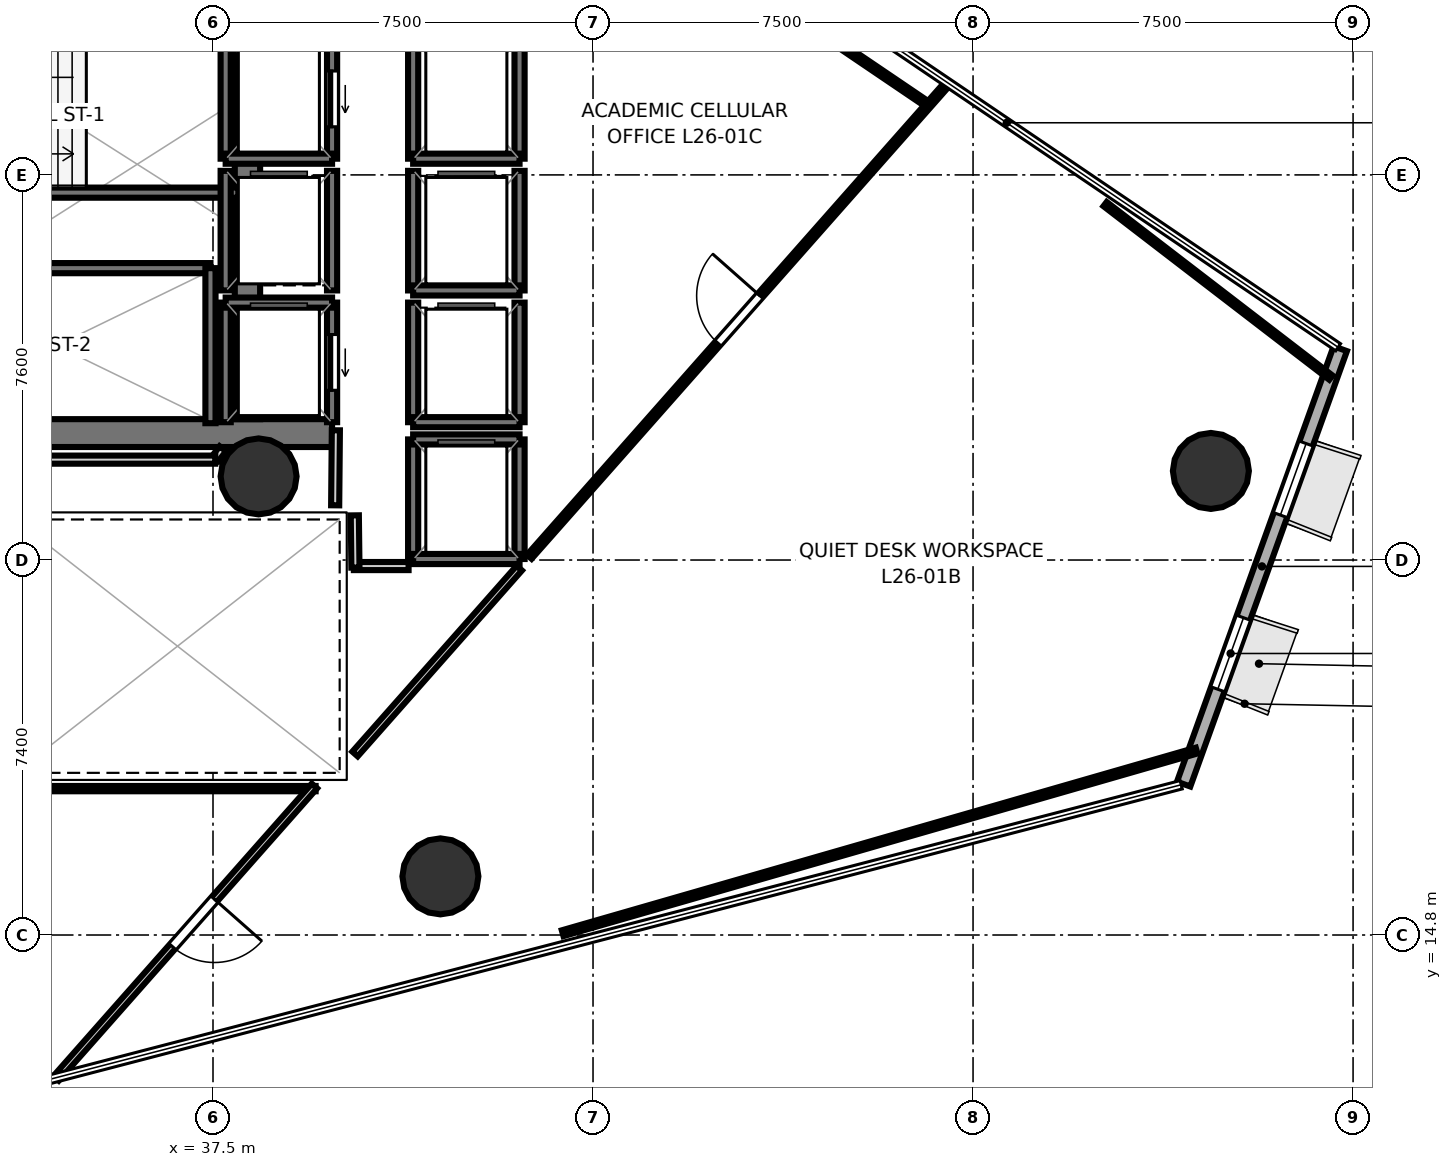
"""IFC4 building model, lengths in metres.
Left out: names, types, materials, properties, quantities, classifications, styles, units other than length and angle.
Written with IfcOpenShell. Run it as: python <this file> out.ifc"""

import sys

from ifc_helpers import new_model, si_unit, direction, frame, frame_2d, origin, origin_2d, place, context, subcontext, project, spatial, rectangle, hollow_circle, extrude, element, fill, save


model = new_model("IFC4")
c1 = context("Model", 3, precision=1e-05, world=origin(), true_north=direction((0.0, 1.0)))
c2 = subcontext(c1, "Body", "Model", "MODEL_VIEW")
j1 = project(units=[si_unit("LENGTHUNIT", "METRE"), si_unit("PLANEANGLEUNIT", "RADIAN")], contexts=[c1])
p1 = place(None, origin())
s1 = spatial("IfcSite", under=j1, at=p1, CompositionType="ELEMENT")
p2 = place(p1, origin())
s2 = spatial("IfcBuilding", under=s1, at=p2, CompositionType="ELEMENT")
p3 = place(p2, frame((0.0, 0.0, 105.2)))
s3 = spatial("IfcBuildingStorey", under=s2, at=p3, CompositionType="ELEMENT", Elevation=105.2)
p4 = place(p3, frame((29.23, 24.705, 0.0), z_axis=(0.0, 0.0, 1.0), x_axis=(1.0, 0.0, 0.0)))
e1 = element("IfcWall", 1, at=p4, inside=s3, PredefinedType="SHEAR", context=c2, shape_type="SweptSolid", body=[
    extrude(rectangle(XDim=10.62, YDim=0.55, at=frame_2d((5.31, 0.0))), origin(), (0.0, 0.0, 1.0), 3.52),
])
p5 = place(p4, frame((0.795, 0.0, 0.0)))
e2 = element("IfcOpeningElement", 2, at=p5, cuts=e1, PredefinedType="OPENING", context=c2, shape_type="SweptSolid", body=[
    extrude(rectangle(XDim=1.25, YDim=2.15, at=frame_2d((0.625, 1.075))), frame((0.0, 0.285, 0.0), z_axis=(0.0, -1.0, 0.0), x_axis=(1.0, 0.0, 0.0)), (0.0, 0.0, 1.0), 0.57),
])
p6 = place(p3, frame((38.18, 24.98, 0.0), z_axis=(0.0, 0.0, 1.0), x_axis=(0.0, 1.0, 0.0)))
e3 = element("IfcWall", 3, at=p6, inside=s3, PredefinedType="SHEAR", context=c2, shape_type="SweptSolid", body=[
    extrude(rectangle(XDim=7.44, YDim=0.5, at=frame_2d((3.72, 0.0))), origin(), (0.0, 0.0, 1.0), 3.52),
])
for number, where, z_axis, x_axis in (
    (4, (38.4, 23.85, 0.0), (0.0, 0.0, 1.0), (1.0, 0.0, 0.0)),
    (5, (57.194, 23.958, 0.0), (0.0, 0.0, 1.0), (1.0, 0.0, 0.0)),
    (6, (41.988, 15.957, 0.0), (0.0, 0.0, 1.0), (1.0, 0.0, 0.0)),
):
    element("IfcColumn", number, at=place(p3, frame(where, z_axis=z_axis, x_axis=x_axis)), inside=s3, PredefinedType="COLUMN", context=c2, shape_type="SweptSolid", body=[
        extrude(hollow_circle(Radius=0.75, WallThickness=0.036, at=origin_2d()), origin(), (0.0, 0.0, 1.0), 3.7),
    ])
p7 = place(p3, frame((56.656, 17.778, 0.0), z_axis=(0.0, 0.0, 1.0), x_axis=(0.338454364394, 0.940982807081, 0.0)))
e7 = element("IfcWall", 7, at=p7, inside=s3, PredefinedType="SOLIDWALL", context=c2, shape_type="SweptSolid", body=[
    extrude(rectangle(XDim=9.131, YDim=0.28, at=frame_2d((4.566, 0.0))), origin(), (0.0, 0.0, 1.0), 3.52),
])
p8 = place(p7, frame((1.99, 0.0, 0.85)))
e8 = element("IfcOpeningElement", 8, at=p8, cuts=e7, PredefinedType="OPENING", context=c2, shape_type="SweptSolid", body=[
    extrude(rectangle(XDim=1.5, YDim=2.1, at=frame_2d((0.75, 1.05))), frame((0.0, 0.15, 0.0), z_axis=(0.0, -1.0, 0.0), x_axis=(1.0, 0.0, 0.0)), (0.0, 0.0, 1.0), 0.3),
])
p9 = place(p7, frame((5.642, 0.0, 0.85)))
e9 = element("IfcOpeningElement", 9, at=p9, cuts=e7, PredefinedType="OPENING", context=c2, shape_type="SweptSolid", body=[
    extrude(rectangle(XDim=1.5, YDim=2.1, at=frame_2d((0.75, 1.05))), frame((0.0, 0.15, 0.0), z_axis=(0.0, -1.0, 0.0), x_axis=(1.0, 0.0, 0.0)), (0.0, 0.0, 1.0), 0.3),
])
p10 = place(p3, frame((29.7, 29.45, 0.0), z_axis=(0.0, 0.0, 1.0), x_axis=(1.0, 0.0, 0.0)))
e10 = element("IfcWall", 10, at=p10, inside=s3, PredefinedType="SOLIDWALL", context=c2, shape_type="SweptSolid", body=[
    extrude(rectangle(XDim=8.3, YDim=0.2, at=frame_2d((4.15, 0.0))), origin(), (0.0, 0.0, 1.0), 3.52),
])
p11 = place(p3, frame((29.7, 27.96, 0.0), z_axis=(0.0, 0.0, 1.0), x_axis=(1.0, 0.0, 0.0)))
e11 = element("IfcWall", 11, at=p11, inside=s3, PredefinedType="SOLIDWALL", context=c2, shape_type="SweptSolid", body=[
    extrude(rectangle(XDim=7.75, YDim=0.2, at=frame_2d((3.875, 0.0))), origin(), (0.0, 0.0, 1.0), 3.52),
])
p12 = place(p3, frame((37.45, 24.9, 0.0), z_axis=(0.0, 0.0, 1.0), x_axis=(0.0, 1.0, 0.0)))
e12 = element("IfcWall", 12, at=p12, inside=s3, PredefinedType="SOLIDWALL", context=c2, shape_type="SweptSolid", body=[
    extrude(rectangle(XDim=3.06, YDim=0.2, at=frame_2d((1.53, 0.0))), origin(), (0.0, 0.0, 1.0), 3.52),
])
p13 = place(p3, frame((39.85, 30.12, 0.0), z_axis=(0.0, 0.0, 1.0), x_axis=(0.0, 1.0, 0.0)))
e13 = element("IfcWall", 13, at=p13, inside=s3, PredefinedType="SOLIDWALL", context=c2, shape_type="SweptSolid", body=[
    extrude(rectangle(XDim=2.36, YDim=0.2, at=frame_2d((1.18, 0.0))), origin(), (0.0, 0.0, 1.0), 3.52),
])
p14 = place(p13, frame((0.63, 0.0, 0.0)))
e14 = element("IfcOpeningElement", 14, at=p14, cuts=e13, PredefinedType="OPENING", context=c2, shape_type="SweptSolid", body=[
    extrude(rectangle(XDim=1.1, YDim=2.15, at=frame_2d((0.55, 1.075))), frame((0.0, 0.11, 0.0), z_axis=(0.0, -1.0, 0.0), x_axis=(1.0, 0.0, 0.0)), (0.0, 0.0, 1.0), 0.22),
])
p15 = place(p3, frame((37.75, 30.12, 0.0), z_axis=(0.0, 0.0, 1.0), x_axis=(0.0, 1.0, 0.0)))
e15 = element("IfcWall", 15, at=p15, inside=s3, PredefinedType="SOLIDWALL", context=c2, shape_type="SweptSolid", body=[
    extrude(rectangle(XDim=2.36, YDim=0.2, at=frame_2d((1.18, 0.0))), origin(), (0.0, 0.0, 1.0), 3.52),
])
p16 = place(p3, frame((37.75, 30.12, 0.0), z_axis=(0.0, 0.0, 1.0), x_axis=(1.0, 0.0, 0.0)))
e16 = element("IfcWall", 16, at=p16, inside=s3, PredefinedType="SOLIDWALL", context=c2, shape_type="SweptSolid", body=[
    extrude(rectangle(XDim=2.1, YDim=0.2, at=frame_2d((1.05, 0.0))), origin(), (0.0, 0.0, 1.0), 3.52),
])
p17 = place(p3, frame((39.85, 24.92, 0.0), z_axis=(0.0, 0.0, 1.0), x_axis=(0.0, 1.0, 0.0)))
e17 = element("IfcWall", 17, at=p17, inside=s3, PredefinedType="SOLIDWALL", context=c2, shape_type="SweptSolid", body=[
    extrude(rectangle(XDim=2.36, YDim=0.2, at=frame_2d((1.18, 0.0))), origin(), (0.0, 0.0, 1.0), 3.52),
])
p18 = place(p17, frame((0.63, 0.0, 0.0)))
e18 = element("IfcOpeningElement", 18, at=p18, cuts=e17, PredefinedType="OPENING", context=c2, shape_type="SweptSolid", body=[
    extrude(rectangle(XDim=1.1, YDim=2.15, at=frame_2d((0.55, 1.075))), frame((0.0, 0.11, 0.0), z_axis=(0.0, -1.0, 0.0), x_axis=(1.0, 0.0, 0.0)), (0.0, 0.0, 1.0), 0.22),
])
p19 = place(p3, frame((37.75, 24.92, 0.0), z_axis=(0.0, 0.0, 1.0), x_axis=(0.0, 1.0, 0.0)))
e19 = element("IfcWall", 19, at=p19, inside=s3, PredefinedType="SOLIDWALL", context=c2, shape_type="SweptSolid", body=[
    extrude(rectangle(XDim=2.36, YDim=0.2, at=frame_2d((1.18, 0.0))), origin(), (0.0, 0.0, 1.0), 3.52),
])
p20 = place(p3, frame((37.75, 27.28, 0.0), z_axis=(0.0, 0.0, 1.0), x_axis=(1.0, 0.0, 0.0)))
e20 = element("IfcWall", 20, at=p20, inside=s3, PredefinedType="SOLIDWALL", context=c2, shape_type="SweptSolid", body=[
    extrude(rectangle(XDim=2.1, YDim=0.2, at=frame_2d((1.05, 0.0))), origin(), (0.0, 0.0, 1.0), 3.52),
])
for number, where, z_axis, x_axis in (
    (21, (43.55, 30.12, 0.0), (0.0, 0.0, 1.0), (0.0, 1.0, 0.0)),
    (22, (41.45, 30.12, 0.0), (0.0, 0.0, 1.0), (0.0, 1.0, 0.0)),
):
    element("IfcWall", number, at=place(p3, frame(where, z_axis=z_axis, x_axis=x_axis)), inside=s3, PredefinedType="SOLIDWALL", context=c2, shape_type="SweptSolid", body=[
        extrude(rectangle(XDim=2.36, YDim=0.2, at=frame_2d((1.18, 0.0))), origin(), (0.0, 0.0, 1.0), 3.52),
    ])
p21 = place(p3, frame((41.45, 30.12, 0.0), z_axis=(0.0, 0.0, 1.0), x_axis=(1.0, 0.0, 0.0)))
e23 = element("IfcWall", 23, at=p21, inside=s3, PredefinedType="SOLIDWALL", context=c2, shape_type="SweptSolid", body=[
    extrude(rectangle(XDim=2.1, YDim=0.2, at=frame_2d((1.05, 0.0))), origin(), (0.0, 0.0, 1.0), 3.52),
])
for number, where, z_axis, x_axis in (
    (24, (43.55, 27.52, 0.0), (0.0, 0.0, 1.0), (0.0, 1.0, 0.0)),
    (25, (41.45, 27.52, 0.0), (0.0, 0.0, 1.0), (0.0, 1.0, 0.0)),
):
    element("IfcWall", number, at=place(p3, frame(where, z_axis=z_axis, x_axis=x_axis)), inside=s3, PredefinedType="SOLIDWALL", context=c2, shape_type="SweptSolid", body=[
        extrude(rectangle(XDim=2.36, YDim=0.2, at=frame_2d((1.18, 0.0))), origin(), (0.0, 0.0, 1.0), 3.52),
    ])
p22 = place(p3, frame((41.45, 27.52, 0.0), z_axis=(0.0, 0.0, 1.0), x_axis=(1.0, 0.0, 0.0)))
e26 = element("IfcWall", 26, at=p22, inside=s3, PredefinedType="SOLIDWALL", context=c2, shape_type="SweptSolid", body=[
    extrude(rectangle(XDim=2.1, YDim=0.2, at=frame_2d((1.05, 0.0))), origin(), (0.0, 0.0, 1.0), 3.52),
])
for number, where, z_axis, x_axis in (
    (27, (43.55, 24.92, 0.0), (0.0, 0.0, 1.0), (0.0, 1.0, 0.0)),
    (28, (41.45, 24.92, 0.0), (0.0, 0.0, 1.0), (0.0, 1.0, 0.0)),
):
    element("IfcWall", number, at=place(p3, frame(where, z_axis=z_axis, x_axis=x_axis)), inside=s3, PredefinedType="SOLIDWALL", context=c2, shape_type="SweptSolid", body=[
        extrude(rectangle(XDim=2.36, YDim=0.2, at=frame_2d((1.18, 0.0))), origin(), (0.0, 0.0, 1.0), 3.52),
    ])
p23 = place(p3, frame((41.45, 24.92, 0.0), z_axis=(0.0, 0.0, 1.0), x_axis=(1.0, 0.0, 0.0)))
e29 = element("IfcWall", 29, at=p23, inside=s3, PredefinedType="SOLIDWALL", context=c2, shape_type="SweptSolid", body=[
    extrude(rectangle(XDim=2.1, YDim=0.2, at=frame_2d((1.05, 0.0))), origin(), (0.0, 0.0, 1.0), 3.52),
])
for number, where, z_axis, x_axis in (
    (30, (39.85, 27.52, 0.0), (0.0, 0.0, 1.0), (0.0, 1.0, 0.0)),
    (31, (37.75, 27.52, 0.0), (0.0, 0.0, 1.0), (0.0, 1.0, 0.0)),
):
    element("IfcWall", number, at=place(p3, frame(where, z_axis=z_axis, x_axis=x_axis)), inside=s3, PredefinedType="SOLIDWALL", context=c2, shape_type="SweptSolid", body=[
        extrude(rectangle(XDim=2.36, YDim=0.2, at=frame_2d((1.18, 0.0))), origin(), (0.0, 0.0, 1.0), 3.52),
    ])
for number, where, z_axis, x_axis in (
    (32, (43.55, 22.22, 0.0), (0.0, 0.0, 1.0), (0.0, 1.0, 0.0)),
    (33, (41.45, 22.22, 0.0), (0.0, 0.0, 1.0), (0.0, 1.0, 0.0)),
):
    element("IfcWall", number, at=place(p3, frame(where, z_axis=z_axis, x_axis=x_axis)), inside=s3, PredefinedType="SOLIDWALL", context=c2, shape_type="SweptSolid", body=[
        extrude(rectangle(XDim=2.36, YDim=0.2, at=frame_2d((1.18, 0.0))), origin(), (0.0, 0.0, 1.0), 3.52),
    ])
for number, where, z_axis, x_axis in (
    (34, (41.45, 24.58, 0.0), (0.0, 0.0, 1.0), (1.0, 0.0, 0.0)),
    (35, (41.45, 22.22, 0.0), (0.0, 0.0, 1.0), (1.0, 0.0, 0.0)),
):
    element("IfcWall", number, at=place(p3, frame(where, z_axis=z_axis, x_axis=x_axis)), inside=s3, PredefinedType="SOLIDWALL", context=c2, shape_type="SweptSolid", body=[
        extrude(rectangle(XDim=2.1, YDim=0.2, at=frame_2d((1.05, 0.0))), origin(), (0.0, 0.0, 1.0), 3.52),
    ])
p24 = place(p3, frame((41.36, 22.081, 0.0), z_axis=(0.0, 0.0, 1.0), x_axis=(-1.0, 0.0, 0.0)))
e36 = element("IfcWall", 36, at=p24, inside=s3, PredefinedType="PARTITIONING", context=c2, shape_type="SweptSolid", body=[
    extrude(rectangle(XDim=1.08, YDim=0.16, at=frame_2d((0.54, 0.0))), origin(), (0.0, 0.0, 1.0), 2.84),
])
p25 = place(p3, frame((40.311, 22.05, 0.0), z_axis=(0.0, 0.0, 1.0), x_axis=(-0.011836292006, 0.999929948642, 0.0)))
e37 = element("IfcWall", 37, at=p25, inside=s3, PredefinedType="PARTITIONING", context=c2, shape_type="SweptSolid", body=[
    extrude(rectangle(XDim=1.031, YDim=0.16, at=frame_2d((0.516, 0.0))), origin(), (0.0, 0.0, 1.0), 2.84),
])
p26 = place(p3, frame((39.911, 23.28, 0.0), z_axis=(0.0, 0.0, 1.0), x_axis=(0.009397771291, 0.999955839972, 0.0)))
e38 = element("IfcWall", 38, at=p26, inside=s3, PredefinedType="PARTITIONING", context=c2, shape_type="SweptSolid", body=[
    extrude(rectangle(XDim=1.481, YDim=0.16, at=frame_2d((0.74, 0.0))), origin(), (0.0, 0.0, 1.0), 2.84),
])
p27 = place(p3, frame((37.694, 24.396, 0.0), z_axis=(0.0, 0.0, 1.0), x_axis=(-0.607118658061, -0.794611184815, 0.0)))
e39 = element("IfcWall", 39, at=p27, inside=s3, PredefinedType="PARTITIONING", context=c2, shape_type="SweptSolid", body=[
    extrude(rectangle(XDim=0.246, YDim=0.16, at=frame_2d((0.123, 0.0))), origin(), (0.0, 0.0, 1.0), 2.84),
])
p28 = place(p3, frame((37.545, 24.181, 0.0), z_axis=(0.0, 0.0, 1.0), x_axis=(-1.0, 0.0, 0.0)))
e40 = element("IfcWall", 40, at=p28, inside=s3, PredefinedType="PARTITIONING", context=c2, shape_type="SweptSolid", body=[
    extrude(rectangle(XDim=4.015, YDim=0.16, at=frame_2d((2.007, 0.0))), origin(), (0.0, 0.0, 1.0), 2.84),
])
p29 = place(p3, frame((33.6, 17.689, 0.0), z_axis=(0.0, 0.0, 1.0), x_axis=(1.0, 0.0, 0.0)))
e41 = element("IfcWall", 41, at=p29, inside=s3, PredefinedType="PARTITIONING", context=c2, shape_type="SweptSolid", body=[
    extrude(rectangle(XDim=5.925, YDim=0.105, at=frame_2d((2.962, 0.0))), origin(), (0.0, 0.0, 1.0), 2.84),
])
p30 = place(p3, frame((39.502, 17.74, 0.0), z_axis=(0.0, 0.0, 1.0), x_axis=(-0.662230930848, -0.749299802635, 0.0)))
e42 = element("IfcWall", 42, at=p30, inside=s3, PredefinedType="PARTITIONING", context=c2, shape_type="SweptSolid", body=[
    extrude(rectangle(XDim=7.697, YDim=0.14, at=frame_2d((3.849, 0.0))), origin(), (0.0, 0.0, 1.0), 2.84),
])
p31 = place(p30, frame((2.98, 0.0, 0.0)))
e43 = element("IfcOpeningElement", 43, at=p31, cuts=e42, PredefinedType="OPENING", context=c2, shape_type="SweptSolid", body=[
    extrude(rectangle(XDim=1.25, YDim=2.2, at=frame_2d((0.625, 1.1))), frame((0.0, 0.08, 0.0), z_axis=(0.0, -1.0, 0.0), x_axis=(1.0, 0.0, 0.0)), (0.0, 0.0, 1.0), 0.16),
])
p32 = place(p3, frame((40.303, 18.372, 0.0), z_axis=(0.0, 0.0, 1.0), x_axis=(0.662221894186, 0.749307789136, 0.0)))
e44 = element("IfcWall", 44, at=p32, inside=s3, PredefinedType="PARTITIONING", context=c2, shape_type="SweptSolid", body=[
    extrude(rectangle(XDim=4.895, YDim=0.14, at=frame_2d((2.447, 0.0))), origin(), (0.0, 0.0, 1.0), 2.84),
])
p33 = place(p3, frame((43.743, 22.264, 0.0), z_axis=(0.0, 0.0, 1.0), x_axis=(0.662202897959, 0.749324577159, 0.0)))
e45 = element("IfcWall", 45, at=p33, inside=s3, PredefinedType="PARTITIONING", context=c2, shape_type="SweptSolid", body=[
    extrude(rectangle(XDim=12.498, YDim=0.12, at=frame_2d((6.249, 0.0))), origin(), (0.0, 0.0, 1.0), 2.84),
])
p34 = place(p33, frame((5.624, 0.0, 0.0)))
e46 = element("IfcOpeningElement", 46, at=p34, cuts=e45, PredefinedType="OPENING", context=c2, shape_type="SweptSolid", body=[
    extrude(rectangle(XDim=1.25, YDim=2.2, at=frame_2d((0.625, 1.1))), frame((0.0, 0.07, 0.0), z_axis=(0.0, -1.0, 0.0), x_axis=(1.0, 0.0, 0.0)), (0.0, 0.0, 1.0), 0.14),
])
p35 = place(p3, frame((55.106, 29.224, 0.0), z_axis=(0.0, 0.0, 1.0), x_axis=(0.792945217065, -0.609292936717, 0.0)))
e47 = element("IfcWall", 47, at=p35, inside=s3, PredefinedType="PARTITIONING", context=c2, shape_type="SweptSolid", body=[
    extrude(rectangle(XDim=5.621, YDim=0.105, at=frame_2d((2.81, 0.0))), origin(), (0.0, 0.0, 1.0), 2.84),
])
p36 = place(p3, frame((56.912, 18.439, 0.0), z_axis=(0.0, 0.0, 1.0), x_axis=(-0.960917353676, -0.276835401285, 0.0)))
e48 = element("IfcWall", 48, at=p36, inside=s3, PredefinedType="PARTITIONING", context=c2, shape_type="SweptSolid", body=[
    extrude(rectangle(XDim=13.02, YDim=0.12, at=frame_2d((6.51, 0.0))), origin(), (0.0, 0.0, 1.0), 2.84),
])
p37 = place(p3, frame((41.65, 37.933, 0.0), z_axis=(0.0, 0.0, 1.0), x_axis=(0.827941747022, -0.560814107827, 0.0)))
e49 = element("IfcWall", 49, at=p37, inside=s3, PredefinedType="PARTITIONING", context=c2, shape_type="SweptSolid", body=[
    extrude(rectangle(XDim=11.895, YDim=0.12, at=frame_2d((5.948, 0.0))), origin(), (0.0, 0.0, 1.0), 2.84),
])
p38 = place(p14, origin())
e50 = element("IfcDoor", 50, at=p38, inside=s3, OperationType="SLIDING_TO_LEFT", PredefinedType="DOOR", context=c2, shape_type="SweptSolid", body=[
    extrude(rectangle(XDim=1.1, YDim=2.15, at=frame_2d((0.55, 1.075))), frame((0.0, 0.025, 0.0), z_axis=(0.0, -1.0, 0.0), x_axis=(1.0, 0.0, 0.0)), (0.0, 0.0, 1.0), 0.05),
])
fill(e14, e50)
p39 = place(p18, origin())
e51 = element("IfcDoor", 51, at=p39, inside=s3, OperationType="SLIDING_TO_LEFT", PredefinedType="DOOR", context=c2, shape_type="SweptSolid", body=[
    extrude(rectangle(XDim=1.1, YDim=2.15, at=frame_2d((0.55, 1.075))), frame((0.0, 0.025, 0.0), z_axis=(0.0, -1.0, 0.0), x_axis=(1.0, 0.0, 0.0)), (0.0, 0.0, 1.0), 0.05),
])
fill(e18, e51)
p40 = place(p31, origin())
e52 = element("IfcDoor", 52, at=p40, inside=s3, OperationType="SINGLE_SWING_LEFT", PredefinedType="DOOR", context=c2, shape_type="SweptSolid", body=[
    extrude(rectangle(XDim=1.25, YDim=2.2, at=frame_2d((0.625, 1.1))), frame((0.0, 0.025, 0.0), z_axis=(0.0, -1.0, 0.0), x_axis=(1.0, 0.0, 0.0)), (0.0, 0.0, 1.0), 0.05),
])
fill(e43, e52)
p41 = place(p34, origin())
e53 = element("IfcDoor", 53, at=p41, inside=s3, OperationType="SINGLE_SWING_RIGHT", PredefinedType="DOOR", context=c2, shape_type="SweptSolid", body=[
    extrude(rectangle(XDim=1.25, YDim=2.2, at=frame_2d((0.625, 1.1))), frame((0.0, 0.025, 0.0), z_axis=(0.0, -1.0, 0.0), x_axis=(1.0, 0.0, 0.0)), (0.0, 0.0, 1.0), 0.05),
])
fill(e46, e53)
p42 = place(p8, origin())
e54 = element("IfcWindow", 54, at=p42, inside=s3, PartitioningType="SINGLE_PANEL", PredefinedType="WINDOW", context=c2, shape_type="SweptSolid", body=[
    extrude(rectangle(XDim=1.5, YDim=2.1, at=frame_2d((0.75, 1.05))), frame((0.0, 0.03, 0.0), z_axis=(0.0, -1.0, 0.0), x_axis=(1.0, 0.0, 0.0)), (0.0, 0.0, 1.0), 0.06),
])
fill(e8, e54)
p43 = place(p9, origin())
e55 = element("IfcWindow", 55, at=p43, inside=s3, PartitioningType="SINGLE_PANEL", PredefinedType="WINDOW", context=c2, shape_type="SweptSolid", body=[
    extrude(rectangle(XDim=1.5, YDim=2.1, at=frame_2d((0.75, 1.05))), frame((0.0, 0.03, 0.0), z_axis=(0.0, -1.0, 0.0), x_axis=(1.0, 0.0, 0.0)), (0.0, 0.0, 1.0), 0.06),
])
fill(e9, e55)
save(model, sys.argv[1])
